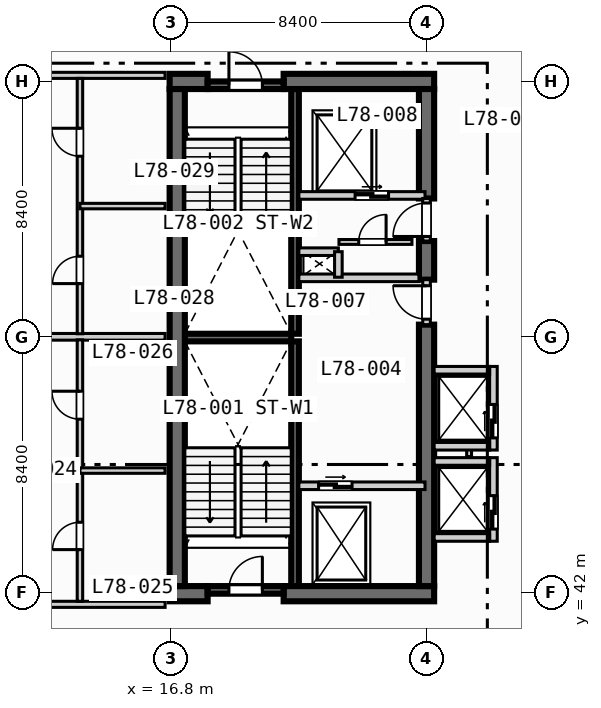
"""IFC4 building model, lengths in metres.
Left out: names, types, materials, properties, quantities, classifications, styles, units other than length and angle.
Written with IfcOpenShell. Run it as: python <this file> out.ifc"""

import sys

from ifc_helpers import new_model, si_unit, direction, frame, frame_2d, origin, place, context, subcontext, project, spatial, rectangle, extrude, element, fill, save


model = new_model("IFC4")
c1 = context("Model", 3, precision=1e-05, world=origin(), true_north=direction((0.0, 1.0)))
c2 = subcontext(c1, "Body", "Model", "MODEL_VIEW")
j1 = project(units=[si_unit("LENGTHUNIT", "METRE"), si_unit("PLANEANGLEUNIT", "RADIAN")], contexts=[c1])
p1 = place(None, origin())
s1 = spatial("IfcSite", under=j1, at=p1, CompositionType="ELEMENT")
p2 = place(p1, origin())
s2 = spatial("IfcBuilding", under=s1, at=p2, CompositionType="ELEMENT")
p3 = place(p2, frame((0.0, 0.0, 316.4)))
s3 = spatial("IfcBuildingStorey", under=s2, at=p3, CompositionType="ELEMENT", Elevation=316.4)
for number, where, z_axis, x_axis in (
    (1, (20.875, 42.2, 0.0), (0.0, 0.0, 1.0), (0.0, 1.0, 0.0)),
    (2, (20.875, 50.5, 0.0), (0.0, 0.0, 1.0), (0.0, 1.0, 0.0)),
):
    element("IfcWall", number, at=place(p3, frame(where, z_axis=z_axis, x_axis=x_axis)), inside=s3, PredefinedType="SOLIDWALL", context=c2, shape_type="SweptSolid", body=[
        extrude(rectangle(XDim=8.05, YDim=0.25, at=frame_2d((4.025, 0.0))), origin(), (0.0, 0.0, 1.0), 3.67),
    ])
p4 = place(p3, frame((17.25, 50.375, 0.0), z_axis=(0.0, 0.0, 1.0), x_axis=(1.0, 0.0, 0.0)))
e3 = element("IfcWall", 3, at=p4, inside=s3, PredefinedType="SOLIDWALL", context=c2, shape_type="SweptSolid", body=[
    extrude(rectangle(XDim=3.5, YDim=0.25, at=frame_2d((1.75, 0.0))), origin(), (0.0, 0.0, 1.0), 3.67),
])
p5 = place(p3, frame((16.75, 41.95, 0.0), z_axis=(0.0, 0.0, 1.0), x_axis=(1.0, 0.0, 0.0)))
e4 = element("IfcWall", 4, at=p5, inside=s3, PredefinedType="SHEAR", context=c2, shape_type="SweptSolid", body=[
    extrude(rectangle(XDim=1.25, YDim=0.5, at=frame_2d((0.625, 0.0))), origin(), (0.0, 0.0, 1.0), 3.67),
])
p6 = place(p3, frame((20.5, 41.95, 0.0), z_axis=(0.0, 0.0, 1.0), x_axis=(1.0, 0.0, 0.0)))
e5 = element("IfcWall", 5, at=p6, inside=s3, PredefinedType="SHEAR", context=c2, shape_type="SweptSolid", body=[
    extrude(rectangle(XDim=4.95, YDim=0.5, at=frame_2d((2.475, 0.0))), origin(), (0.0, 0.0, 1.0), 3.67),
])
p7 = place(p3, frame((16.75, 58.8, 0.0), z_axis=(0.0, 0.0, 1.0), x_axis=(1.0, 0.0, 0.0)))
e6 = element("IfcWall", 6, at=p7, inside=s3, PredefinedType="SHEAR", context=c2, shape_type="SweptSolid", body=[
    extrude(rectangle(XDim=1.25, YDim=0.5, at=frame_2d((0.625, 0.0))), origin(), (0.0, 0.0, 1.0), 3.67),
])
p8 = place(p3, frame((20.5, 58.8, 0.0), z_axis=(0.0, 0.0, 1.0), x_axis=(1.0, 0.0, 0.0)))
e7 = element("IfcWall", 7, at=p8, inside=s3, PredefinedType="SHEAR", context=c2, shape_type="SweptSolid", body=[
    extrude(rectangle(XDim=4.95, YDim=0.5, at=frame_2d((2.475, 0.0))), origin(), (0.0, 0.0, 1.0), 3.67),
])
p9 = place(p3, frame((17.0, 42.2, 0.0), z_axis=(0.0, 0.0, 1.0), x_axis=(0.0, 1.0, 0.0)))
e8 = element("IfcWall", 8, at=p9, inside=s3, PredefinedType="SHEAR", context=c2, shape_type="SweptSolid", body=[
    extrude(rectangle(XDim=16.35, YDim=0.5, at=frame_2d((8.175, 0.0))), origin(), (0.0, 0.0, 1.0), 3.67),
])
p10 = place(p3, frame((25.2, 42.2, 0.0), z_axis=(0.0, 0.0, 1.0), x_axis=(0.0, 1.0, 0.0)))
e9 = element("IfcWall", 9, at=p10, inside=s3, PredefinedType="SHEAR", context=c2, shape_type="SweptSolid", body=[
    extrude(rectangle(XDim=8.6, YDim=0.5, at=frame_2d((4.3, 0.0))), origin(), (0.0, 0.0, 1.0), 3.67),
])
p11 = place(p3, frame((25.2, 52.28, 0.0), z_axis=(0.0, 0.0, 1.0), x_axis=(0.0, 1.0, 0.0)))
e10 = element("IfcWall", 10, at=p11, inside=s3, PredefinedType="SHEAR", context=c2, shape_type="SweptSolid", body=[
    extrude(rectangle(XDim=1.27, YDim=0.5, at=frame_2d((0.635, 0.0))), origin(), (0.0, 0.0, 1.0), 3.67),
])
p12 = place(p3, frame((25.2, 54.95, 0.0), z_axis=(0.0, 0.0, 1.0), x_axis=(0.0, 1.0, 0.0)))
e11 = element("IfcWall", 11, at=p12, inside=s3, PredefinedType="SHEAR", context=c2, shape_type="SweptSolid", body=[
    extrude(rectangle(XDim=3.6, YDim=0.5, at=frame_2d((1.8, 0.0))), origin(), (0.0, 0.0, 1.0), 3.67),
])
p13 = place(p3, frame((18.0, 42.075, 0.0), z_axis=(0.0, 0.0, 1.0), x_axis=(1.0, 0.0, 0.0)))
e12 = element("IfcWall", 12, at=p13, inside=s3, PredefinedType="SOLIDWALL", context=c2, shape_type="SweptSolid", body=[
    extrude(rectangle(XDim=2.5, YDim=0.25, at=frame_2d((1.25, 0.0))), origin(), (0.0, 0.0, 1.0), 3.67),
])
p14 = place(p13, frame((0.7, 0.0, 0.0)))
e13 = element("IfcOpeningElement", 13, at=p14, cuts=e12, PredefinedType="OPENING", context=c2, shape_type="SweptSolid", body=[
    extrude(rectangle(XDim=1.1, YDim=2.15, at=frame_2d((0.55, 1.075))), frame((0.0, 0.135, 0.0), z_axis=(0.0, -1.0, 0.0), x_axis=(1.0, 0.0, 0.0)), (0.0, 0.0, 1.0), 0.27),
])
p15 = place(p3, frame((18.0, 58.675, 0.0), z_axis=(0.0, 0.0, 1.0), x_axis=(1.0, 0.0, 0.0)))
e14 = element("IfcWall", 14, at=p15, inside=s3, PredefinedType="SOLIDWALL", context=c2, shape_type="SweptSolid", body=[
    extrude(rectangle(XDim=2.5, YDim=0.25, at=frame_2d((1.25, 0.0))), origin(), (0.0, 0.0, 1.0), 3.67),
])
p16 = place(p15, frame((0.7, 0.0, 0.0)))
e15 = element("IfcOpeningElement", 15, at=p16, cuts=e14, PredefinedType="OPENING", context=c2, shape_type="SweptSolid", body=[
    extrude(rectangle(XDim=1.1, YDim=2.15, at=frame_2d((0.55, 1.075))), frame((0.0, 0.135, 0.0), z_axis=(0.0, -1.0, 0.0), x_axis=(1.0, 0.0, 0.0)), (0.0, 0.0, 1.0), 0.27),
])
p17 = place(p3, frame((21.0, 45.5, 0.0), z_axis=(0.0, 0.0, 1.0), x_axis=(1.0, 0.0, 0.0)))
e16 = element("IfcWall", 16, at=p17, inside=s3, PredefinedType="SOLIDWALL", context=c2, shape_type="SweptSolid", body=[
    extrude(rectangle(XDim=4.15, YDim=0.25, at=frame_2d((2.075, 0.0))), origin(), (0.0, 0.0, 1.0), 3.67),
])
p18 = place(p17, frame((0.65, 0.0, 0.0)))
e17 = element("IfcOpeningElement", 17, at=p18, cuts=e16, PredefinedType="OPENING", context=c2, shape_type="SweptSolid", body=[
    extrude(rectangle(XDim=1.1, YDim=2.15, at=frame_2d((0.55, 1.075))), frame((0.0, 0.135, 0.0), z_axis=(0.0, -1.0, 0.0), x_axis=(1.0, 0.0, 0.0)), (0.0, 0.0, 1.0), 0.27),
])
p19 = place(p3, frame((25.2, 50.8, 0.0), z_axis=(0.0, 0.0, 1.0), x_axis=(0.0, 1.0, 0.0)))
e18 = element("IfcWall", 18, at=p19, inside=s3, PredefinedType="SOLIDWALL", context=c2, shape_type="SweptSolid", body=[
    extrude(rectangle(XDim=1.48, YDim=0.25, at=frame_2d((0.74, 0.0))), origin(), (0.0, 0.0, 1.0), 3.67),
])
p20 = place(p19, frame((0.18, 0.0, 0.0)))
e19 = element("IfcOpeningElement", 19, at=p20, cuts=e18, PredefinedType="OPENING", context=c2, shape_type="SweptSolid", body=[
    extrude(rectangle(XDim=1.1, YDim=2.15, at=frame_2d((0.55, 1.075))), frame((0.0, 0.135, 0.0), z_axis=(0.0, -1.0, 0.0), x_axis=(1.0, 0.0, 0.0)), (0.0, 0.0, 1.0), 0.27),
])
p21 = place(p3, frame((21.0, 52.34, 0.0), z_axis=(0.0, 0.0, 1.0), x_axis=(1.0, 0.0, 0.0)))
e20 = element("IfcWall", 20, at=p21, inside=s3, PredefinedType="SOLIDWALL", context=c2, shape_type="SweptSolid", body=[
    extrude(rectangle(XDim=3.95, YDim=0.25, at=frame_2d((1.975, 0.0))), origin(), (0.0, 0.0, 1.0), 3.67),
])
p22 = place(p3, frame((21.0, 55.05, 0.0), z_axis=(0.0, 0.0, 1.0), x_axis=(1.0, 0.0, 0.0)))
e21 = element("IfcWall", 21, at=p22, inside=s3, PredefinedType="SOLIDWALL", context=c2, shape_type="SweptSolid", body=[
    extrude(rectangle(XDim=4.15, YDim=0.25, at=frame_2d((2.075, 0.0))), origin(), (0.0, 0.0, 1.0), 3.67),
])
p23 = place(p22, frame((1.85, 0.0, 0.0)))
e22 = element("IfcOpeningElement", 22, at=p23, cuts=e21, PredefinedType="OPENING", context=c2, shape_type="SweptSolid", body=[
    extrude(rectangle(XDim=1.1, YDim=2.15, at=frame_2d((0.55, 1.075))), frame((0.0, 0.135, 0.0), z_axis=(0.0, -1.0, 0.0), x_axis=(1.0, 0.0, 0.0)), (0.0, 0.0, 1.0), 0.27),
])
p24 = place(p3, frame((25.2, 53.55, 0.0), z_axis=(0.0, 0.0, 1.0), x_axis=(0.0, 1.0, 0.0)))
e23 = element("IfcWall", 23, at=p24, inside=s3, PredefinedType="SOLIDWALL", context=c2, shape_type="SweptSolid", body=[
    extrude(rectangle(XDim=1.4, YDim=0.25, at=frame_2d((0.7, 0.0))), origin(), (0.0, 0.0, 1.0), 3.67),
])
p25 = place(p24, frame((0.15, 0.0, 0.0)))
e24 = element("IfcOpeningElement", 24, at=p25, cuts=e23, PredefinedType="OPENING", context=c2, shape_type="SweptSolid", body=[
    extrude(rectangle(XDim=1.1, YDim=2.15, at=frame_2d((0.55, 1.075))), frame((0.0, 0.135, 0.0), z_axis=(0.0, -1.0, 0.0), x_axis=(1.0, 0.0, 0.0)), (0.0, 0.0, 1.0), 0.27),
])
p26 = place(p3, frame((21.0, 53.2, 0.0), z_axis=(0.0, 0.0, 1.0), x_axis=(1.0, 0.0, 0.0)))
e25 = element("IfcWall", 25, at=p26, inside=s3, PredefinedType="SOLIDWALL", context=c2, shape_type="SweptSolid", body=[
    extrude(rectangle(XDim=1.3, YDim=0.25, at=frame_2d((0.65, 0.0))), origin(), (0.0, 0.0, 1.0), 3.67),
])
p27 = place(p3, frame((22.3, 52.36, 0.0), z_axis=(0.0, 0.0, 1.0), x_axis=(0.0, 1.0, 0.0)))
e26 = element("IfcWall", 26, at=p27, inside=s3, PredefinedType="SOLIDWALL", context=c2, shape_type="SweptSolid", body=[
    extrude(rectangle(XDim=0.84, YDim=0.25, at=frame_2d((0.42, 0.0))), origin(), (0.0, 0.0, 1.0), 3.67),
])
p28 = place(p3, frame((22.32, 53.52, 0.0), z_axis=(0.0, 0.0, 1.0), x_axis=(1.0, 0.0, 0.0)))
e27 = element("IfcWall", 27, at=p28, inside=s3, PredefinedType="PARTITIONING", context=c2, shape_type="SweptSolid", body=[
    extrude(rectangle(XDim=2.4, YDim=0.16, at=frame_2d((1.2, 0.0))), origin(), (0.0, 0.0, 1.0), 3.67),
])
p29 = place(p28, frame((0.65, 0.0, 0.0)))
e28 = element("IfcOpeningElement", 28, at=p29, cuts=e27, PredefinedType="OPENING", context=c2, shape_type="SweptSolid", body=[
    extrude(rectangle(XDim=0.9, YDim=2.1, at=frame_2d((0.45, 1.05))), frame((0.0, 0.09, 0.0), z_axis=(0.0, -1.0, 0.0), x_axis=(1.0, 0.0, 0.0)), (0.0, 0.0, 1.0), 0.18),
])
p30 = place(p3, frame((27.4, 43.675, 0.0), z_axis=(0.0, 0.0, 1.0), x_axis=(0.0, 1.0, 0.0)))
e29 = element("IfcWall", 29, at=p30, inside=s3, PredefinedType="SOLIDWALL", context=c2, shape_type="SweptSolid", body=[
    extrude(rectangle(XDim=2.75, YDim=0.25, at=frame_2d((1.375, 0.0))), origin(), (0.0, 0.0, 1.0), 3.67),
])
p31 = place(p30, frame((0.4, 0.0, 0.0)))
e30 = element("IfcOpeningElement", 30, at=p31, cuts=e29, PredefinedType="OPENING", context=c2, shape_type="SweptSolid", body=[
    extrude(rectangle(XDim=1.1, YDim=2.15, at=frame_2d((0.55, 1.075))), frame((0.0, 0.135, 0.0), z_axis=(0.0, -1.0, 0.0), x_axis=(1.0, 0.0, 0.0)), (0.0, 0.0, 1.0), 0.27),
])
for number, where, z_axis, x_axis in (
    (31, (25.45, 43.8, 0.0), (0.0, 0.0, 1.0), (1.0, 0.0, 0.0)),
    (32, (25.45, 46.3, 0.0), (0.0, 0.0, 1.0), (1.0, 0.0, 0.0)),
):
    element("IfcWall", number, at=place(p3, frame(where, z_axis=z_axis, x_axis=x_axis)), inside=s3, PredefinedType="SOLIDWALL", context=c2, shape_type="SweptSolid", body=[
        extrude(rectangle(XDim=1.825, YDim=0.25, at=frame_2d((0.913, 0.0))), origin(), (0.0, 0.0, 1.0), 3.67),
    ])
p32 = place(p3, frame((26.6, 46.46, 0.0), z_axis=(0.0, 0.0, 1.0), x_axis=(0.0, 1.0, 0.0)))
e33 = element("IfcWall", 33, at=p32, inside=s3, PredefinedType="PARTITIONING", context=c2, shape_type="SweptSolid", body=[
    extrude(rectangle(XDim=0.88, YDim=0.16, at=frame_2d((0.44, 0.0))), origin(), (0.0, 0.0, 1.0), 3.67),
])
p33 = place(p3, frame((27.4, 46.675, 0.0), z_axis=(0.0, 0.0, 1.0), x_axis=(0.0, 1.0, 0.0)))
e34 = element("IfcWall", 34, at=p33, inside=s3, PredefinedType="SOLIDWALL", context=c2, shape_type="SweptSolid", body=[
    extrude(rectangle(XDim=2.75, YDim=0.25, at=frame_2d((1.375, 0.0))), origin(), (0.0, 0.0, 1.0), 3.67),
])
p34 = place(p33, frame((0.4, 0.0, 0.0)))
e35 = element("IfcOpeningElement", 35, at=p34, cuts=e34, PredefinedType="OPENING", context=c2, shape_type="SweptSolid", body=[
    extrude(rectangle(XDim=1.1, YDim=2.15, at=frame_2d((0.55, 1.075))), frame((0.0, 0.135, 0.0), z_axis=(0.0, -1.0, 0.0), x_axis=(1.0, 0.0, 0.0)), (0.0, 0.0, 1.0), 0.27),
])
for number, where, z_axis, x_axis in (
    (36, (25.45, 46.8, 0.0), (0.0, 0.0, 1.0), (1.0, 0.0, 0.0)),
    (37, (25.45, 49.3, 0.0), (0.0, 0.0, 1.0), (1.0, 0.0, 0.0)),
):
    element("IfcWall", number, at=place(p3, frame(where, z_axis=z_axis, x_axis=x_axis)), inside=s3, PredefinedType="SOLIDWALL", context=c2, shape_type="SweptSolid", body=[
        extrude(rectangle(XDim=1.825, YDim=0.25, at=frame_2d((0.913, 0.0))), origin(), (0.0, 0.0, 1.0), 3.67),
    ])
p35 = place(p3, frame((8.65, 41.6, 0.0), z_axis=(0.0, 0.0, 1.0), x_axis=(1.0, 0.0, 0.0)))
e38 = element("IfcWall", 38, at=p35, inside=s3, PredefinedType="PARTITIONING", context=c2, shape_type="SweptSolid", body=[
    extrude(rectangle(XDim=7.95, YDim=0.2, at=frame_2d((3.975, 0.0))), origin(), (0.0, 0.0, 1.0), 3.67),
])
p36 = place(p35, frame((2.0, 0.0, 0.0)))
e39 = element("IfcOpeningElement", 39, at=p36, cuts=e38, PredefinedType="OPENING", context=c2, shape_type="SweptSolid", body=[
    extrude(rectangle(XDim=1.0, YDim=2.15, at=frame_2d((0.5, 1.075))), frame((0.0, 0.11, 0.0), z_axis=(0.0, -1.0, 0.0), x_axis=(1.0, 0.0, 0.0)), (0.0, 0.0, 1.0), 0.22),
])
p37 = place(p3, frame((8.65, 59.0, 0.0), z_axis=(0.0, 0.0, 1.0), x_axis=(1.0, 0.0, 0.0)))
e40 = element("IfcWall", 40, at=p37, inside=s3, PredefinedType="PARTITIONING", context=c2, shape_type="SweptSolid", body=[
    extrude(rectangle(XDim=7.95, YDim=0.2, at=frame_2d((3.975, 0.0))), origin(), (0.0, 0.0, 1.0), 3.07),
])
p38 = place(p37, frame((2.0, 0.0, 0.0)))
e41 = element("IfcOpeningElement", 41, at=p38, cuts=e40, PredefinedType="OPENING", context=c2, shape_type="SweptSolid", body=[
    extrude(rectangle(XDim=1.0, YDim=2.15, at=frame_2d((0.5, 1.075))), frame((0.0, 0.11, 0.0), z_axis=(0.0, -1.0, 0.0), x_axis=(1.0, 0.0, 0.0)), (0.0, 0.0, 1.0), 0.22),
])
p39 = place(p3, frame((8.65, 50.4, 0.0), z_axis=(0.0, 0.0, 1.0), x_axis=(1.0, 0.0, 0.0)))
e42 = element("IfcWall", 42, at=p39, inside=s3, PredefinedType="PARTITIONING", context=c2, shape_type="SweptSolid", body=[
    extrude(rectangle(XDim=7.95, YDim=0.22, at=frame_2d((3.975, 0.0))), origin(), (0.0, 0.0, 1.0), 3.207),
])
p40 = place(p3, frame((13.8, 41.7, 0.0), z_axis=(0.0, 0.0, 1.0), x_axis=(0.0, 1.0, 0.0)))
e43 = element("IfcWall", 43, at=p40, inside=s3, PredefinedType="PLUMBINGWALL", context=c2, shape_type="SweptSolid", body=[
    extrude(rectangle(XDim=8.6, YDim=0.18, at=frame_2d((4.3, 0.0))), origin(), (0.0, 0.0, 1.0), 3.67),
])
p41 = place(p40, frame((1.7, 0.0, 0.0)))
e44 = element("IfcOpeningElement", 44, at=p41, cuts=e43, PredefinedType="OPENING", context=c2, shape_type="SweptSolid", body=[
    extrude(rectangle(XDim=0.9, YDim=2.1, at=frame_2d((0.45, 1.05))), frame((0.0, 0.1, 0.0), z_axis=(0.0, -1.0, 0.0), x_axis=(1.0, 0.0, 0.0)), (0.0, 0.0, 1.0), 0.2),
])
p42 = place(p40, frame((5.99, 0.0, 0.0)))
e45 = element("IfcOpeningElement", 45, at=p42, cuts=e43, PredefinedType="OPENING", context=c2, shape_type="SweptSolid", body=[
    extrude(rectangle(XDim=0.92, YDim=2.1, at=frame_2d((0.46, 1.05))), frame((0.0, 0.1, 0.0), z_axis=(0.0, -1.0, 0.0), x_axis=(1.0, 0.0, 0.0)), (0.0, 0.0, 1.0), 0.2),
])
p43 = place(p3, frame((13.8, 46.0, 0.0), z_axis=(0.0, 0.0, 1.0), x_axis=(1.0, 0.0, 0.0)))
e46 = element("IfcWall", 46, at=p43, inside=s3, PredefinedType="PLUMBINGWALL", context=c2, shape_type="SweptSolid", body=[
    extrude(rectangle(XDim=2.8, YDim=0.18, at=frame_2d((1.4, 0.0))), origin(), (0.0, 0.0, 1.0), 3.67),
])
p44 = place(p3, frame((13.8, 50.5, 0.0), z_axis=(0.0, 0.0, 1.0), x_axis=(0.0, 1.0, 0.0)))
e47 = element("IfcWall", 47, at=p44, inside=s3, PredefinedType="PLUMBINGWALL", context=c2, shape_type="SweptSolid", body=[
    extrude(rectangle(XDim=8.4, YDim=0.18, at=frame_2d((4.2, 0.0))), origin(), (0.0, 0.0, 1.0), 3.67),
])
p45 = place(p44, frame((1.65, 0.0, 0.0)))
e48 = element("IfcOpeningElement", 48, at=p45, cuts=e47, PredefinedType="OPENING", context=c2, shape_type="SweptSolid", body=[
    extrude(rectangle(XDim=0.9, YDim=2.1, at=frame_2d((0.45, 1.05))), frame((0.0, 0.1, 0.0), z_axis=(0.0, -1.0, 0.0), x_axis=(1.0, 0.0, 0.0)), (0.0, 0.0, 1.0), 0.2),
])
p46 = place(p44, frame((5.84, 0.0, 0.0)))
e49 = element("IfcOpeningElement", 49, at=p46, cuts=e47, PredefinedType="OPENING", context=c2, shape_type="SweptSolid", body=[
    extrude(rectangle(XDim=0.92, YDim=2.1, at=frame_2d((0.46, 1.05))), frame((0.0, 0.1, 0.0), z_axis=(0.0, -1.0, 0.0), x_axis=(1.0, 0.0, 0.0)), (0.0, 0.0, 1.0), 0.2),
])
p47 = place(p3, frame((13.8, 54.7, 0.0), z_axis=(0.0, 0.0, 1.0), x_axis=(1.0, 0.0, 0.0)))
e50 = element("IfcWall", 50, at=p47, inside=s3, PredefinedType="PLUMBINGWALL", context=c2, shape_type="SweptSolid", body=[
    extrude(rectangle(XDim=2.8, YDim=0.18, at=frame_2d((1.4, 0.0))), origin(), (0.0, 0.0, 1.0), 3.67),
])
p48 = place(p14, origin())
e51 = element("IfcDoor", 51, at=p48, inside=s3, OperationType="SINGLE_SWING_RIGHT", PredefinedType="DOOR", context=c2, shape_type="SweptSolid", body=[
    extrude(rectangle(XDim=1.1, YDim=2.15, at=frame_2d((0.55, 1.075))), frame((0.0, 0.025, 0.0), z_axis=(0.0, -1.0, 0.0), x_axis=(1.0, 0.0, 0.0)), (0.0, 0.0, 1.0), 0.05),
])
fill(e13, e51)
p49 = place(p16, origin())
e52 = element("IfcDoor", 52, at=p49, inside=s3, OperationType="SINGLE_SWING_LEFT", PredefinedType="DOOR", context=c2, shape_type="SweptSolid", body=[
    extrude(rectangle(XDim=1.1, YDim=2.15, at=frame_2d((0.55, 1.075))), frame((0.0, 0.025, 0.0), z_axis=(0.0, -1.0, 0.0), x_axis=(1.0, 0.0, 0.0)), (0.0, 0.0, 1.0), 0.05),
])
fill(e15, e52)
p50 = place(p18, origin())
e53 = element("IfcDoor", 53, at=p50, inside=s3, OperationType="SLIDING_TO_LEFT", PredefinedType="DOOR", context=c2, shape_type="SweptSolid", body=[
    extrude(rectangle(XDim=1.1, YDim=2.15, at=frame_2d((0.55, 1.075))), frame((0.0, 0.025, 0.0), z_axis=(0.0, -1.0, 0.0), x_axis=(1.0, 0.0, 0.0)), (0.0, 0.0, 1.0), 0.05),
])
fill(e17, e53)
p51 = place(p20, origin())
e54 = element("IfcDoor", 54, at=p51, inside=s3, OperationType="SINGLE_SWING_RIGHT", PredefinedType="DOOR", context=c2, shape_type="SweptSolid", body=[
    extrude(rectangle(XDim=1.1, YDim=2.15, at=frame_2d((0.55, 1.075))), frame((0.0, 0.025, 0.0), z_axis=(0.0, -1.0, 0.0), x_axis=(1.0, 0.0, 0.0)), (0.0, 0.0, 1.0), 0.05),
])
fill(e19, e54)
p52 = place(p23, origin())
e55 = element("IfcDoor", 55, at=p52, inside=s3, OperationType="SLIDING_TO_LEFT", PredefinedType="DOOR", context=c2, shape_type="SweptSolid", body=[
    extrude(rectangle(XDim=1.1, YDim=2.15, at=frame_2d((0.55, 1.075))), frame((0.0, 0.025, 0.0), z_axis=(0.0, -1.0, 0.0), x_axis=(1.0, 0.0, 0.0)), (0.0, 0.0, 1.0), 0.05),
])
fill(e22, e55)
p53 = place(p25, origin())
e56 = element("IfcDoor", 56, at=p53, inside=s3, OperationType="SINGLE_SWING_LEFT", PredefinedType="DOOR", context=c2, shape_type="SweptSolid", body=[
    extrude(rectangle(XDim=1.1, YDim=2.15, at=frame_2d((0.55, 1.075))), frame((0.0, 0.025, 0.0), z_axis=(0.0, -1.0, 0.0), x_axis=(1.0, 0.0, 0.0)), (0.0, 0.0, 1.0), 0.05),
])
fill(e24, e56)
p54 = place(p29, origin())
e57 = element("IfcDoor", 57, at=p54, inside=s3, OperationType="SINGLE_SWING_RIGHT", PredefinedType="DOOR", context=c2, shape_type="SweptSolid", body=[
    extrude(rectangle(XDim=0.9, YDim=2.1, at=frame_2d((0.45, 1.05))), frame((0.0, 0.025, 0.0), z_axis=(0.0, -1.0, 0.0), x_axis=(1.0, 0.0, 0.0)), (0.0, 0.0, 1.0), 0.05),
])
fill(e28, e57)
p55 = place(p31, origin())
e58 = element("IfcDoor", 58, at=p55, inside=s3, OperationType="SLIDING_TO_LEFT", PredefinedType="DOOR", context=c2, shape_type="SweptSolid", body=[
    extrude(rectangle(XDim=1.1, YDim=2.15, at=frame_2d((0.55, 1.075))), frame((0.0, 0.025, 0.0), z_axis=(0.0, -1.0, 0.0), x_axis=(1.0, 0.0, 0.0)), (0.0, 0.0, 1.0), 0.05),
])
fill(e30, e58)
p56 = place(p34, origin())
e59 = element("IfcDoor", 59, at=p56, inside=s3, OperationType="SLIDING_TO_LEFT", PredefinedType="DOOR", context=c2, shape_type="SweptSolid", body=[
    extrude(rectangle(XDim=1.1, YDim=2.15, at=frame_2d((0.55, 1.075))), frame((0.0, 0.025, 0.0), z_axis=(0.0, -1.0, 0.0), x_axis=(1.0, 0.0, 0.0)), (0.0, 0.0, 1.0), 0.05),
])
fill(e35, e59)
p57 = place(p41, origin())
e60 = element("IfcDoor", 60, at=p57, inside=s3, OperationType="SINGLE_SWING_LEFT", PredefinedType="DOOR", context=c2, shape_type="SweptSolid", body=[
    extrude(rectangle(XDim=0.9, YDim=2.1, at=frame_2d((0.45, 1.05))), frame((0.0, 0.025, 0.0), z_axis=(0.0, -1.0, 0.0), x_axis=(1.0, 0.0, 0.0)), (0.0, 0.0, 1.0), 0.05),
])
fill(e44, e60)
p58 = place(p42, origin())
e61 = element("IfcDoor", 61, at=p58, inside=s3, OperationType="SINGLE_SWING_RIGHT", PredefinedType="DOOR", context=c2, shape_type="SweptSolid", body=[
    extrude(rectangle(XDim=0.92, YDim=2.1, at=frame_2d((0.46, 1.05))), frame((0.0, 0.025, 0.0), z_axis=(0.0, -1.0, 0.0), x_axis=(1.0, 0.0, 0.0)), (0.0, 0.0, 1.0), 0.05),
])
fill(e45, e61)
p59 = place(p45, origin())
e62 = element("IfcDoor", 62, at=p59, inside=s3, OperationType="SINGLE_SWING_LEFT", PredefinedType="DOOR", context=c2, shape_type="SweptSolid", body=[
    extrude(rectangle(XDim=0.9, YDim=2.1, at=frame_2d((0.45, 1.05))), frame((0.0, 0.025, 0.0), z_axis=(0.0, -1.0, 0.0), x_axis=(1.0, 0.0, 0.0)), (0.0, 0.0, 1.0), 0.05),
])
fill(e48, e62)
p60 = place(p46, origin())
e63 = element("IfcDoor", 63, at=p60, inside=s3, OperationType="SINGLE_SWING_RIGHT", PredefinedType="DOOR", context=c2, shape_type="SweptSolid", body=[
    extrude(rectangle(XDim=0.92, YDim=2.1, at=frame_2d((0.46, 1.05))), frame((0.0, 0.025, 0.0), z_axis=(0.0, -1.0, 0.0), x_axis=(1.0, 0.0, 0.0)), (0.0, 0.0, 1.0), 0.05),
])
fill(e49, e63)
save(model, sys.argv[1])
